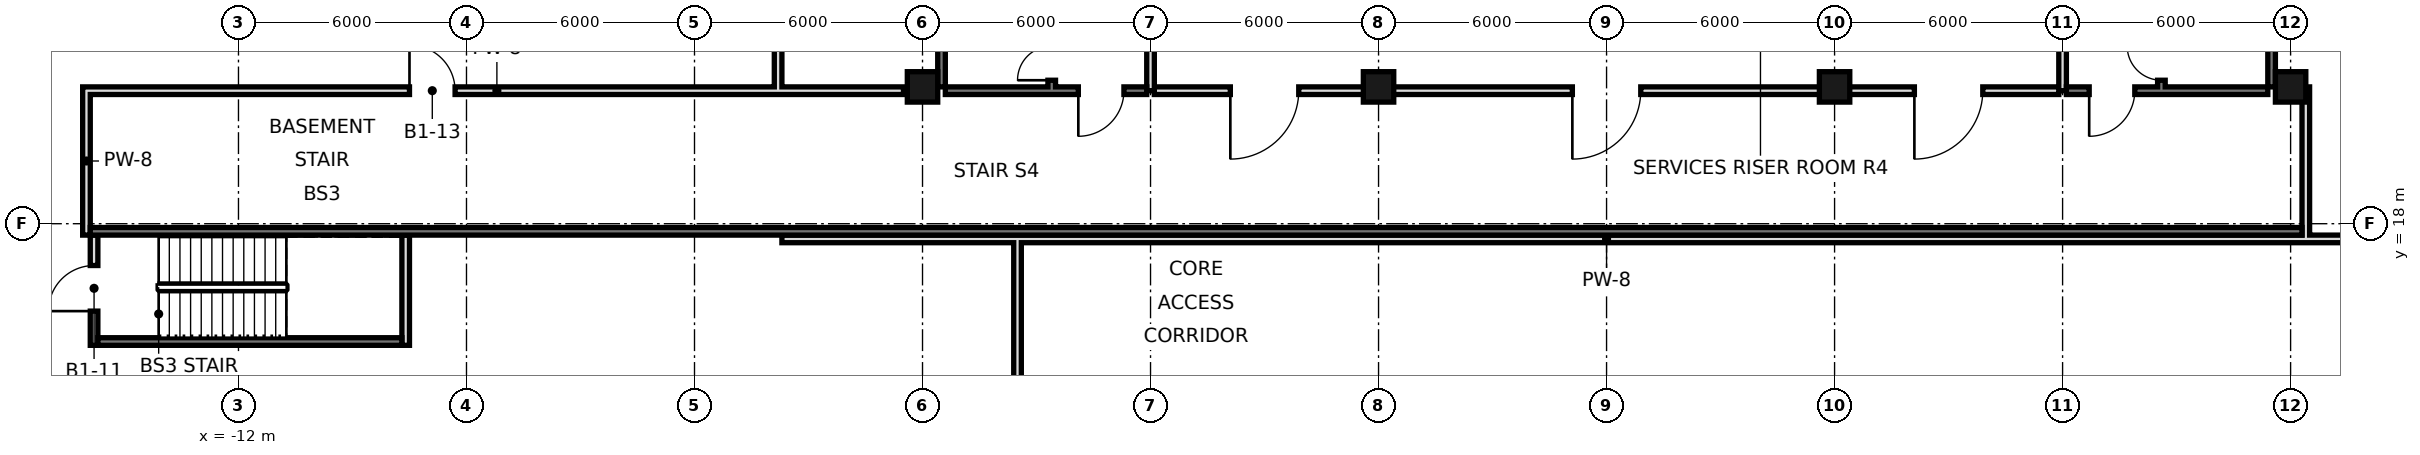
"""IFC4 building model, lengths in metres.
Left out: names, types, materials, properties, quantities, classifications, styles, units other than length and angle.
Written with IfcOpenShell. Run it as: python <this file> out.ifc"""

import sys

from ifc_helpers import new_model, si_unit, direction, frame, frame_2d, origin, origin_2d, place, context, subcontext, project, spatial, rectangle, hollow_rectangle, extrude, element, fill, save


model = new_model("IFC4")
c1 = context("Model", 3, precision=1e-05, world=origin(), true_north=direction((0.0, 1.0)))
c2 = subcontext(c1, "Body", "Model", "MODEL_VIEW")
j1 = project(units=[si_unit("LENGTHUNIT", "METRE"), si_unit("PLANEANGLEUNIT", "RADIAN")], contexts=[c1])
p1 = place(None, origin())
s1 = spatial("IfcSite", under=j1, at=p1, CompositionType="ELEMENT")
p2 = place(p1, origin())
s2 = spatial("IfcBuilding", under=s1, at=p2, CompositionType="ELEMENT")
p3 = place(p2, frame((0.0, 0.0, -4.5)))
s3 = spatial("IfcBuildingStorey", under=s2, at=p3, CompositionType="ELEMENT", Elevation=-4.5)
for number, where, z_axis, x_axis in (
    (1, (6.0, 21.6, 0.0), (0.0, 0.0, 1.0), (1.0, 0.0, 0.0)),
    (2, (18.0, 21.6, 0.0), (0.0, 0.0, 1.0), (1.0, 0.0, 0.0)),
    (3, (30.0, 21.6, 0.0), (0.0, 0.0, 1.0), (1.0, 0.0, 0.0)),
    (4, (42.0, 21.6, 0.0), (0.0, 0.0, 1.0), (1.0, 0.0, 0.0)),
):
    element("IfcColumn", number, at=place(p3, frame(where, z_axis=z_axis, x_axis=x_axis)), inside=s3, PredefinedType="COLUMN", context=c2, shape_type="SweptSolid", body=[
        extrude(hollow_rectangle(XDim=0.8, YDim=0.8, WallThickness=0.07, at=origin_2d()), origin(), (0.0, 0.0, 1.0), 4.5),
    ])
p4 = place(p3, frame((-16.0, 17.7, 0.0), z_axis=(0.0, 0.0, 1.0), x_axis=(0.0, 1.0, 0.0)))
e5 = element("IfcWall", 5, at=p4, inside=s3, PredefinedType="SOLIDWALL", context=c2, shape_type="SweptSolid", body=[
    extrude(rectangle(XDim=3.9, YDim=0.2, at=frame_2d((1.95, 0.0))), origin(), (0.0, 0.0, 1.0), 4.14),
])
p5 = place(p3, frame((-15.8, 14.8, 0.0), z_axis=(0.0, 0.0, 1.0), x_axis=(0.0, 1.0, 0.0)))
e6 = element("IfcWall", 6, at=p5, inside=s3, PredefinedType="SOLIDWALL", context=c2, shape_type="SweptSolid", body=[
    extrude(rectangle(XDim=2.9, YDim=0.2, at=frame_2d((1.45, 0.0))), origin(), (0.0, 0.0, 1.0), 4.14),
])
p6 = place(p5, frame((0.9, 0.0, 0.0)))
e7 = element("IfcOpeningElement", 7, at=p6, cuts=e6, PredefinedType="OPENING", context=c2, shape_type="SweptSolid", body=[
    extrude(rectangle(XDim=1.2, YDim=2.4, at=frame_2d((0.6, 1.2))), frame((0.0, 0.11, 0.0), z_axis=(0.0, -1.0, 0.0), x_axis=(1.0, 0.0, 0.0)), (0.0, 0.0, 1.0), 0.22),
])
p7 = place(p3, frame((-7.6, 14.8, 0.0), z_axis=(0.0, 0.0, 1.0), x_axis=(0.0, 1.0, 0.0)))
e8 = element("IfcWall", 8, at=p7, inside=s3, PredefinedType="SOLIDWALL", context=c2, shape_type="SweptSolid", body=[
    extrude(rectangle(XDim=2.9, YDim=0.2, at=frame_2d((1.45, 0.0))), origin(), (0.0, 0.0, 1.0), 4.14),
])
p8 = place(p3, frame((2.2, 21.6, 0.0), z_axis=(0.0, 0.0, 1.0), x_axis=(0.0, 1.0, 0.0)))
e9 = element("IfcWall", 9, at=p8, inside=s3, PredefinedType="SOLIDWALL", context=c2, shape_type="SweptSolid", body=[
    extrude(rectangle(XDim=28.0, YDim=0.2, at=frame_2d((14.0, 0.0))), origin(), (0.0, 0.0, 1.0), 3.04),
])
p9 = place(p3, frame((8.5, -11.0, 0.0), z_axis=(0.0, 0.0, 1.0), x_axis=(0.0, 1.0, 0.0)))
e10 = element("IfcWall", 10, at=p9, inside=s3, PredefinedType="SOLIDWALL", context=c2, shape_type="SweptSolid", body=[
    extrude(rectangle(XDim=28.5, YDim=0.2, at=frame_2d((14.25, 0.0))), origin(), (0.0, 0.0, 1.0), 3.04),
])
p10 = place(p9, frame((0.25, 0.0, 0.0)))
e11 = element("IfcOpeningElement", 11, at=p10, cuts=e10, PredefinedType="OPENING", context=c2, shape_type="SweptSolid", body=[
    extrude(rectangle(XDim=5.3, YDim=2.4, at=frame_2d((2.65, 1.2))), frame((0.0, 0.11, 0.0), z_axis=(0.0, -1.0, 0.0), x_axis=(1.0, 0.0, 0.0)), (0.0, 0.0, 1.0), 0.22),
])
p11 = place(p9, frame((14.25, 0.0, 0.0)))
e12 = element("IfcOpeningElement", 12, at=p11, cuts=e10, PredefinedType="OPENING", context=c2, shape_type="SweptSolid", body=[
    extrude(rectangle(XDim=5.5, YDim=2.4, at=frame_2d((2.75, 1.2))), frame((0.0, 0.11, 0.0), z_axis=(0.0, -1.0, 0.0), x_axis=(1.0, 0.0, 0.0)), (0.0, 0.0, 1.0), 0.22),
])
p12 = place(p3, frame((42.4, 17.7, 0.0), z_axis=(0.0, 0.0, 1.0), x_axis=(0.0, 1.0, 0.0)))
e13 = element("IfcWall", 13, at=p12, inside=s3, PredefinedType="SOLIDWALL", context=c2, shape_type="SweptSolid", body=[
    extrude(rectangle(XDim=3.9, YDim=0.2, at=frame_2d((1.95, 0.0))), origin(), (0.0, 0.0, 1.0), 4.14),
])
p13 = place(p3, frame((-15.7, 14.9, 0.0), z_axis=(0.0, 0.0, 1.0), x_axis=(1.0, 0.0, 0.0)))
e14 = element("IfcWall", 14, at=p13, inside=s3, PredefinedType="SOLIDWALL", context=c2, shape_type="SweptSolid", body=[
    extrude(rectangle(XDim=8.0, YDim=0.2, at=frame_2d((4.0, 0.0))), origin(), (0.0, 0.0, 1.0), 4.14),
])
p14 = place(p3, frame((2.3, 17.6, 0.0), z_axis=(0.0, 0.0, 1.0), x_axis=(1.0, 0.0, 0.0)))
e15 = element("IfcWall", 15, at=p14, inside=s3, PredefinedType="SOLIDWALL", context=c2, shape_type="SweptSolid", body=[
    extrude(rectangle(XDim=43.4, YDim=0.2, at=frame_2d((21.7, 0.0))), origin(), (0.0, 0.0, 1.0), 3.04),
])
p15 = place(p3, frame((-15.9, 17.8, 0.0), z_axis=(0.0, 0.0, 1.0), x_axis=(1.0, 0.0, 0.0)))
e16 = element("IfcWall", 16, at=p15, inside=s3, PredefinedType="SOLIDWALL", context=c2, shape_type="SweptSolid", body=[
    extrude(rectangle(XDim=58.2, YDim=0.2, at=frame_2d((29.1, 0.0))), origin(), (0.0, 0.0, 1.0), 3.04),
])
p16 = place(p3, frame((-15.9, 21.5, 0.0), z_axis=(0.0, 0.0, 1.0), x_axis=(1.0, 0.0, 0.0)))
e17 = element("IfcWall", 17, at=p16, inside=s3, PredefinedType="SOLIDWALL", context=c2, shape_type="SweptSolid", body=[
    extrude(rectangle(XDim=21.4, YDim=0.2, at=frame_2d((10.7, 0.0))), origin(), (0.0, 0.0, 1.0), 3.04),
])
p17 = place(p16, frame((8.4, 0.0, 0.0)))
e18 = element("IfcOpeningElement", 18, at=p17, cuts=e17, PredefinedType="OPENING", context=c2, shape_type="SweptSolid", body=[
    extrude(rectangle(XDim=1.2, YDim=2.4, at=frame_2d((0.6, 1.2))), frame((0.0, 0.11, 0.0), z_axis=(0.0, -1.0, 0.0), x_axis=(1.0, 0.0, 0.0)), (0.0, 0.0, 1.0), 0.22),
])
for number, where, z_axis, x_axis in (
    (19, (6.5, 21.6, 0.0), (0.0, 0.0, 1.0), (0.0, 1.0, 0.0)),
    (20, (41.5, 21.6, 0.0), (0.0, 0.0, 1.0), (0.0, 1.0, 0.0)),
):
    element("IfcWall", number, at=place(p3, frame(where, z_axis=z_axis, x_axis=x_axis)), inside=s3, PredefinedType="SOLIDWALL", context=c2, shape_type="SweptSolid", body=[
        extrude(rectangle(XDim=23.5, YDim=0.2, at=frame_2d((11.75, 0.0))), origin(), (0.0, 0.0, 1.0), 4.14),
    ])
p18 = place(p3, frame((12.1, 21.5, 0.0), z_axis=(0.0, 0.0, 1.0), x_axis=(1.0, 0.0, 0.0)))
e21 = element("IfcWall", 21, at=p18, inside=s3, PredefinedType="SOLIDWALL", context=c2, shape_type="SweptSolid", body=[
    extrude(rectangle(XDim=23.8, YDim=0.2, at=frame_2d((11.9, 0.0))), origin(), (0.0, 0.0, 1.0), 3.04),
])
p19 = place(p18, frame((2.0, 0.0, 0.0)))
e22 = element("IfcOpeningElement", 22, at=p19, cuts=e21, PredefinedType="OPENING", context=c2, shape_type="SweptSolid", body=[
    extrude(rectangle(XDim=1.8, YDim=2.1, at=frame_2d((0.9, 1.05))), frame((0.0, 0.11, 0.0), z_axis=(0.0, -1.0, 0.0), x_axis=(1.0, 0.0, 0.0)), (0.0, 0.0, 1.0), 0.22),
])
p20 = place(p18, frame((11.0, 0.0, 0.0)))
e23 = element("IfcOpeningElement", 23, at=p20, cuts=e21, PredefinedType="OPENING", context=c2, shape_type="SweptSolid", body=[
    extrude(rectangle(XDim=1.8, YDim=2.1, at=frame_2d((0.9, 1.05))), frame((0.0, 0.11, 0.0), z_axis=(0.0, -1.0, 0.0), x_axis=(1.0, 0.0, 0.0)), (0.0, 0.0, 1.0), 0.22),
])
p21 = place(p18, frame((20.0, 0.0, 0.0)))
e24 = element("IfcOpeningElement", 24, at=p21, cuts=e21, PredefinedType="OPENING", context=c2, shape_type="SweptSolid", body=[
    extrude(rectangle(XDim=1.8, YDim=2.1, at=frame_2d((0.9, 1.05))), frame((0.0, 0.11, 0.0), z_axis=(0.0, -1.0, 0.0), x_axis=(1.0, 0.0, 0.0)), (0.0, 0.0, 1.0), 0.22),
])
for number, where, z_axis, x_axis in (
    (25, (12.0, 21.5, 0.0), (0.0, 0.0, 1.0), (0.0, 1.0, 0.0)),
    (26, (36.0, 21.5, 0.0), (0.0, 0.0, 1.0), (0.0, 1.0, 0.0)),
):
    element("IfcWall", number, at=place(p3, frame(where, z_axis=z_axis, x_axis=x_axis)), inside=s3, PredefinedType="PARTITIONING", context=c2, shape_type="SweptSolid", body=[
        extrude(rectangle(XDim=6.0, YDim=0.2, at=frame_2d((3.0, 0.0))), origin(), (0.0, 0.0, 1.0), 3.04),
    ])
p22 = place(p3, frame((38.6, 21.5, 0.0), z_axis=(0.0, 0.0, 1.0), x_axis=(0.0, 1.0, 0.0)))
e27 = element("IfcWall", 27, at=p22, inside=s3, PredefinedType="SOLIDWALL", context=c2, shape_type="SweptSolid", body=[
    extrude(rectangle(XDim=23.5, YDim=0.2, at=frame_2d((11.75, 0.0))), origin(), (0.0, 0.0, 1.0), 3.04),
])
p23 = place(p22, frame((8.7, 0.0, 0.0)))
e28 = element("IfcOpeningElement", 28, at=p23, cuts=e27, PredefinedType="OPENING", context=c2, shape_type="SweptSolid", body=[
    extrude(rectangle(XDim=1.0, YDim=2.1, at=frame_2d((0.5, 1.05))), frame((0.0, 0.11, 0.0), z_axis=(0.0, -1.0, 0.0), x_axis=(1.0, 0.0, 0.0)), (0.0, 0.0, 1.0), 0.22),
])
p24 = place(p22, frame((13.35, 0.0, 0.0)))
e29 = element("IfcOpeningElement", 29, at=p24, cuts=e27, PredefinedType="OPENING", context=c2, shape_type="SweptSolid", body=[
    extrude(rectangle(XDim=1.0, YDim=2.1, at=frame_2d((0.5, 1.05))), frame((0.0, 0.11, 0.0), z_axis=(0.0, -1.0, 0.0), x_axis=(1.0, 0.0, 0.0)), (0.0, 0.0, 1.0), 0.22),
])
p25 = place(p22, frame((22.2, 0.0, 0.0)))
e30 = element("IfcOpeningElement", 30, at=p25, cuts=e27, PredefinedType="OPENING", context=c2, shape_type="SweptSolid", body=[
    extrude(rectangle(XDim=1.0, YDim=2.1, at=frame_2d((0.5, 1.05))), frame((0.0, 0.11, 0.0), z_axis=(0.0, -1.0, 0.0), x_axis=(1.0, 0.0, 0.0)), (0.0, 0.0, 1.0), 0.22),
])
p26 = place(p22, frame((0.275, 0.0, 0.0)))
e31 = element("IfcOpeningElement", 31, at=p26, cuts=e27, PredefinedType="OPENING", context=c2, shape_type="SweptSolid", body=[
    extrude(rectangle(XDim=0.9, YDim=2.1, at=frame_2d((0.45, 1.05))), frame((0.0, 0.11, 0.0), z_axis=(0.0, -1.0, 0.0), x_axis=(1.0, 0.0, 0.0)), (0.0, 0.0, 1.0), 0.22),
])
p27 = place(p3, frame((9.4, 21.5, 0.0), z_axis=(0.0, 0.0, 1.0), x_axis=(0.0, 1.0, 0.0)))
e32 = element("IfcWall", 32, at=p27, inside=s3, PredefinedType="SOLIDWALL", context=c2, shape_type="SweptSolid", body=[
    extrude(rectangle(XDim=23.5, YDim=0.2, at=frame_2d((11.75, 0.0))), origin(), (0.0, 0.0, 1.0), 3.04),
])
p28 = place(p27, frame((7.1, 0.0, 0.0)))
e33 = element("IfcOpeningElement", 33, at=p28, cuts=e32, PredefinedType="OPENING", context=c2, shape_type="SweptSolid", body=[
    extrude(rectangle(XDim=1.1, YDim=2.1, at=frame_2d((0.55, 1.05))), frame((0.0, 0.11, 0.0), z_axis=(0.0, -1.0, 0.0), x_axis=(1.0, 0.0, 0.0)), (0.0, 0.0, 1.0), 0.22),
])
p29 = place(p27, frame((10.2, 0.0, 0.0)))
e34 = element("IfcOpeningElement", 34, at=p29, cuts=e32, PredefinedType="OPENING", context=c2, shape_type="SweptSolid", body=[
    extrude(rectangle(XDim=1.1, YDim=2.1, at=frame_2d((0.55, 1.05))), frame((0.0, 0.11, 0.0), z_axis=(0.0, -1.0, 0.0), x_axis=(1.0, 0.0, 0.0)), (0.0, 0.0, 1.0), 0.22),
])
p30 = place(p27, frame((13.3, 0.0, 0.0)))
e35 = element("IfcOpeningElement", 35, at=p30, cuts=e32, PredefinedType="OPENING", context=c2, shape_type="SweptSolid", body=[
    extrude(rectangle(XDim=1.1, YDim=2.1, at=frame_2d((0.55, 1.05))), frame((0.0, 0.11, 0.0), z_axis=(0.0, -1.0, 0.0), x_axis=(1.0, 0.0, 0.0)), (0.0, 0.0, 1.0), 0.22),
])
p31 = place(p27, frame((22.2, 0.0, 0.0)))
e36 = element("IfcOpeningElement", 36, at=p31, cuts=e32, PredefinedType="OPENING", context=c2, shape_type="SweptSolid", body=[
    extrude(rectangle(XDim=1.0, YDim=2.1, at=frame_2d((0.5, 1.05))), frame((0.0, 0.11, 0.0), z_axis=(0.0, -1.0, 0.0), x_axis=(1.0, 0.0, 0.0)), (0.0, 0.0, 1.0), 0.22),
])
p32 = place(p27, frame((0.275, 0.0, 0.0)))
e37 = element("IfcOpeningElement", 37, at=p32, cuts=e32, PredefinedType="OPENING", context=c2, shape_type="SweptSolid", body=[
    extrude(rectangle(XDim=0.9, YDim=2.1, at=frame_2d((0.45, 1.05))), frame((0.0, 0.11, 0.0), z_axis=(0.0, -1.0, 0.0), x_axis=(1.0, 0.0, 0.0)), (0.0, 0.0, 1.0), 0.22),
])
p33 = place(p3, frame((36.1, 21.5, 0.0), z_axis=(0.0, 0.0, 1.0), x_axis=(1.0, 0.0, 0.0)))
e38 = element("IfcWall", 38, at=p33, inside=s3, PredefinedType="SOLIDWALL", context=c2, shape_type="SweptSolid", body=[
    extrude(rectangle(XDim=5.3, YDim=0.2, at=frame_2d((2.65, 0.0))), origin(), (0.0, 0.0, 1.0), 3.04),
])
p34 = place(p33, frame((0.6, 0.0, 0.0)))
e39 = element("IfcOpeningElement", 39, at=p34, cuts=e38, PredefinedType="OPENING", context=c2, shape_type="SweptSolid", body=[
    extrude(rectangle(XDim=1.2, YDim=2.1, at=frame_2d((0.6, 1.05))), frame((0.0, 0.11, 0.0), z_axis=(0.0, -1.0, 0.0), x_axis=(1.0, 0.0, 0.0)), (0.0, 0.0, 1.0), 0.22),
])
p35 = place(p3, frame((6.6, 21.5, 0.0), z_axis=(0.0, 0.0, 1.0), x_axis=(1.0, 0.0, 0.0)))
e40 = element("IfcWall", 40, at=p35, inside=s3, PredefinedType="SOLIDWALL", context=c2, shape_type="SweptSolid", body=[
    extrude(rectangle(XDim=5.3, YDim=0.2, at=frame_2d((2.65, 0.0))), origin(), (0.0, 0.0, 1.0), 3.04),
])
p36 = place(p35, frame((3.5, 0.0, 0.0)))
e41 = element("IfcOpeningElement", 41, at=p36, cuts=e40, PredefinedType="OPENING", context=c2, shape_type="SweptSolid", body=[
    extrude(rectangle(XDim=1.2, YDim=2.1, at=frame_2d((0.6, 1.05))), frame((0.0, 0.11, 0.0), z_axis=(0.0, -1.0, 0.0), x_axis=(1.0, 0.0, 0.0)), (0.0, 0.0, 1.0), 0.22),
])
p37 = place(p6, origin())
e42 = element("IfcDoor", 42, at=p37, inside=s3, OperationType="SINGLE_SWING_LEFT", PredefinedType="DOOR", context=c2, shape_type="SweptSolid", body=[
    extrude(rectangle(XDim=1.2, YDim=2.4, at=frame_2d((0.6, 1.2))), frame((0.0, 0.025, 0.0), z_axis=(0.0, -1.0, 0.0), x_axis=(1.0, 0.0, 0.0)), (0.0, 0.0, 1.0), 0.05),
])
fill(e7, e42)
p38 = place(p17, origin())
e43 = element("IfcDoor", 43, at=p38, inside=s3, OperationType="SINGLE_SWING_LEFT", PredefinedType="DOOR", context=c2, shape_type="SweptSolid", body=[
    extrude(rectangle(XDim=1.2, YDim=2.4, at=frame_2d((0.6, 1.2))), frame((0.0, 0.025, 0.0), z_axis=(0.0, -1.0, 0.0), x_axis=(1.0, 0.0, 0.0)), (0.0, 0.0, 1.0), 0.05),
])
fill(e18, e43)
p39 = place(p19, frame((1.8, 0.0, 0.0), z_axis=(0.0, 0.0, 1.0), x_axis=(-1.0, 0.0, 0.0)))
e44 = element("IfcDoor", 44, at=p39, inside=s3, OperationType="SINGLE_SWING_RIGHT", PredefinedType="DOOR", context=c2, shape_type="SweptSolid", body=[
    extrude(rectangle(XDim=1.8, YDim=2.1, at=frame_2d((0.9, 1.05))), frame((0.0, 0.025, 0.0), z_axis=(0.0, -1.0, 0.0), x_axis=(1.0, 0.0, 0.0)), (0.0, 0.0, 1.0), 0.05),
])
fill(e22, e44)
p40 = place(p20, frame((1.8, 0.0, 0.0), z_axis=(0.0, 0.0, 1.0), x_axis=(-1.0, 0.0, 0.0)))
e45 = element("IfcDoor", 45, at=p40, inside=s3, OperationType="SINGLE_SWING_RIGHT", PredefinedType="DOOR", context=c2, shape_type="SweptSolid", body=[
    extrude(rectangle(XDim=1.8, YDim=2.1, at=frame_2d((0.9, 1.05))), frame((0.0, 0.025, 0.0), z_axis=(0.0, -1.0, 0.0), x_axis=(1.0, 0.0, 0.0)), (0.0, 0.0, 1.0), 0.05),
])
fill(e23, e45)
p41 = place(p21, frame((1.8, 0.0, 0.0), z_axis=(0.0, 0.0, 1.0), x_axis=(-1.0, 0.0, 0.0)))
e46 = element("IfcDoor", 46, at=p41, inside=s3, OperationType="SINGLE_SWING_RIGHT", PredefinedType="DOOR", context=c2, shape_type="SweptSolid", body=[
    extrude(rectangle(XDim=1.8, YDim=2.1, at=frame_2d((0.9, 1.05))), frame((0.0, 0.025, 0.0), z_axis=(0.0, -1.0, 0.0), x_axis=(1.0, 0.0, 0.0)), (0.0, 0.0, 1.0), 0.05),
])
fill(e24, e46)
p42 = place(p36, frame((1.2, 0.0, 0.0), z_axis=(0.0, 0.0, 1.0), x_axis=(-1.0, 0.0, 0.0)))
e47 = element("IfcDoor", 47, at=p42, inside=s3, OperationType="SINGLE_SWING_RIGHT", PredefinedType="DOOR", context=c2, shape_type="SweptSolid", body=[
    extrude(rectangle(XDim=1.2, YDim=2.1, at=frame_2d((0.6, 1.05))), frame((0.0, 0.025, 0.0), z_axis=(0.0, -1.0, 0.0), x_axis=(1.0, 0.0, 0.0)), (0.0, 0.0, 1.0), 0.05),
])
fill(e41, e47)
p43 = place(p34, frame((1.2, 0.0, 0.0), z_axis=(0.0, 0.0, 1.0), x_axis=(-1.0, 0.0, 0.0)))
e48 = element("IfcDoor", 48, at=p43, inside=s3, OperationType="SINGLE_SWING_RIGHT", PredefinedType="DOOR", context=c2, shape_type="SweptSolid", body=[
    extrude(rectangle(XDim=1.2, YDim=2.1, at=frame_2d((0.6, 1.05))), frame((0.0, 0.025, 0.0), z_axis=(0.0, -1.0, 0.0), x_axis=(1.0, 0.0, 0.0)), (0.0, 0.0, 1.0), 0.05),
])
fill(e39, e48)
p44 = place(p32, origin())
e49 = element("IfcDoor", 49, at=p44, inside=s3, OperationType="SINGLE_SWING_LEFT", PredefinedType="DOOR", context=c2, shape_type="SweptSolid", body=[
    extrude(rectangle(XDim=0.9, YDim=2.1, at=frame_2d((0.45, 1.05))), frame((0.0, 0.025, 0.0), z_axis=(0.0, -1.0, 0.0), x_axis=(1.0, 0.0, 0.0)), (0.0, 0.0, 1.0), 0.05),
])
fill(e37, e49)
p45 = place(p26, frame((0.9, 0.0, 0.0), z_axis=(0.0, 0.0, 1.0), x_axis=(-1.0, 0.0, 0.0)))
e50 = element("IfcDoor", 50, at=p45, inside=s3, OperationType="SINGLE_SWING_LEFT", PredefinedType="DOOR", context=c2, shape_type="SweptSolid", body=[
    extrude(rectangle(XDim=0.9, YDim=2.1, at=frame_2d((0.45, 1.05))), frame((0.0, 0.025, 0.0), z_axis=(0.0, -1.0, 0.0), x_axis=(1.0, 0.0, 0.0)), (0.0, 0.0, 1.0), 0.05),
])
fill(e31, e50)
save(model, sys.argv[1])
